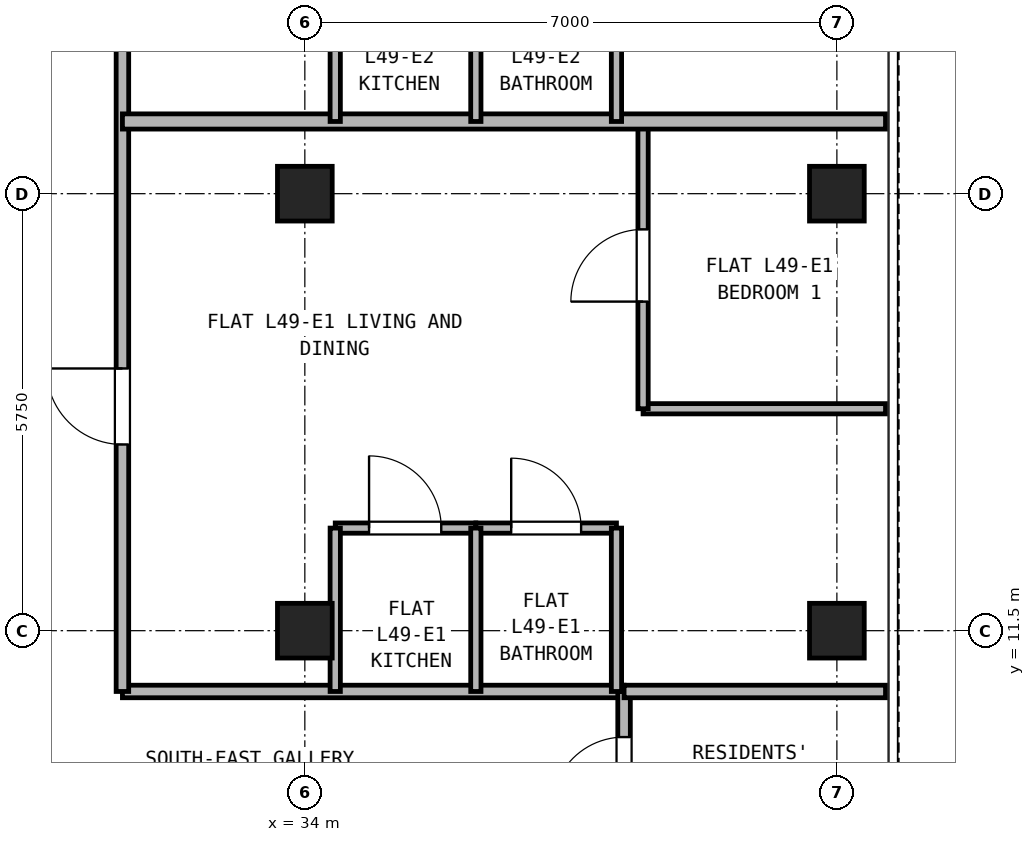
"""IFC4 building model, lengths in metres.
Left out: names, types, materials, properties, quantities, classifications, styles, units other than length and angle.
Written with IfcOpenShell. Run it as: python <this file> out.ifc"""

import sys

from ifc_helpers import new_model, si_unit, direction, frame, frame_2d, origin, origin_2d, place, context, subcontext, project, spatial, rectangle, hollow_rectangle, extrude, source, transform, mapped, element, fill, save


model = new_model("IFC4")
c1 = context("Model", 3, precision=1e-05, world=origin(), true_north=direction((0.0, 1.0)))
c2 = subcontext(c1, "Body", "Model", "MODEL_VIEW")
j1 = project(units=[si_unit("LENGTHUNIT", "METRE"), si_unit("PLANEANGLEUNIT", "RADIAN")], contexts=[c1])
p1 = place(None, origin())
s1 = spatial("IfcSite", under=j1, at=p1, CompositionType="ELEMENT")
p2 = place(p1, origin())
s2 = spatial("IfcBuilding", under=s1, at=p2, CompositionType="ELEMENT")
p3 = place(p2, frame((0.0, 0.0, 175.3)))
s3 = spatial("IfcBuildingStorey", under=s2, at=p3, CompositionType="ELEMENT", Elevation=175.3)
m1 = source(origin(), c2, "Body", "SweptSolid", [
    extrude(hollow_rectangle(XDim=0.72, YDim=0.72, WallThickness=0.04, at=origin_2d()), origin(), (0.0, 0.0, 1.0), 2.95),
])
for number, where, z_axis, x_axis in (
    (1, (41.0, 11.5, 0.0), (0.0, 0.0, 1.0), (1.0, 0.0, 0.0)),
    (2, (41.0, 17.25, 0.0), (0.0, 0.0, 1.0), (1.0, 0.0, 0.0)),
    (3, (34.0, 11.5, 0.0), (0.0, 0.0, 1.0), (1.0, 0.0, 0.0)),
    (4, (34.0, 17.25, 0.0), (0.0, 0.0, 1.0), (1.0, 0.0, 0.0)),
):
    element("IfcColumn", number, at=place(p3, frame(where, z_axis=z_axis, x_axis=x_axis)), inside=s3, PredefinedType="COLUMN", context=c2, shape_type="MappedRepresentation", body=[
        mapped(m1, transform((0.0, 0.0, 0.0), x_axis=(1.0, 0.0, 0.0), y_axis=(0.0, 1.0, 0.0), z_axis=(0.0, 0.0, 1.0), scale=1.0)),
    ])
p4 = place(p3, frame((31.6, 10.7, 0.0), z_axis=(0.0, 0.0, 1.0), x_axis=(1.0, 0.0, 0.0)))
e5 = element("IfcWall", 5, at=p4, inside=s3, PredefinedType="PARTITIONING", context=c2, shape_type="SweptSolid", body=[
    extrude(rectangle(XDim=6.6, YDim=0.165, at=frame_2d((3.3, 0.0))), origin(), (0.0, 0.0, 1.0), 2.95),
])
p5 = place(p3, frame((38.2, 8.7, 0.0), z_axis=(0.0, 0.0, 1.0), x_axis=(0.0, 1.0, 0.0)))
e6 = element("IfcWall", 6, at=p5, inside=s3, PredefinedType="PARTITIONING", context=c2, shape_type="SweptSolid", body=[
    extrude(rectangle(XDim=2.0, YDim=0.165, at=frame_2d((1.0, 0.0))), origin(), (0.0, 0.0, 1.0), 2.95),
])
p6 = place(p5, frame((0.45, 0.0, 0.0)))
e7 = element("IfcOpeningElement", 7, at=p6, cuts=e6, PredefinedType="OPENING", context=c2, shape_type="SweptSolid", body=[
    extrude(rectangle(XDim=0.95, YDim=2.15, at=frame_2d((0.475, 1.075))), frame((0.0, 0.093, 0.0), z_axis=(0.0, -1.0, 0.0), x_axis=(1.0, 0.0, 0.0)), (0.0, 0.0, 1.0), 0.185),
])
p7 = place(p3, frame((31.6, 10.7, 0.0), z_axis=(0.0, 0.0, 1.0), x_axis=(0.0, 1.0, 0.0)))
e8 = element("IfcWall", 8, at=p7, inside=s3, PredefinedType="PARTITIONING", context=c2, shape_type="SweptSolid", body=[
    extrude(rectangle(XDim=24.44, YDim=0.165, at=frame_2d((12.22, 0.0))), origin(), (0.0, 0.0, 1.0), 2.95),
])
p8 = place(p7, frame((3.25, 0.0, 0.0)))
e9 = element("IfcOpeningElement", 9, at=p8, cuts=e8, PredefinedType="OPENING", context=c2, shape_type="SweptSolid", body=[
    extrude(rectangle(XDim=1.0, YDim=2.15, at=frame_2d((0.5, 1.075))), frame((0.0, 0.093, 0.0), z_axis=(0.0, -1.0, 0.0), x_axis=(1.0, 0.0, 0.0)), (0.0, 0.0, 1.0), 0.185),
])
p9 = place(p7, frame((11.15, 0.0, 0.0)))
e10 = element("IfcOpeningElement", 10, at=p9, cuts=e8, PredefinedType="OPENING", context=c2, shape_type="SweptSolid", body=[
    extrude(rectangle(XDim=1.0, YDim=2.15, at=frame_2d((0.5, 1.075))), frame((0.0, 0.093, 0.0), z_axis=(0.0, -1.0, 0.0), x_axis=(1.0, 0.0, 0.0)), (0.0, 0.0, 1.0), 0.185),
])
p10 = place(p7, frame((17.7, 0.0, 0.0)))
e11 = element("IfcOpeningElement", 11, at=p10, cuts=e8, PredefinedType="OPENING", context=c2, shape_type="SweptSolid", body=[
    extrude(rectangle(XDim=1.0, YDim=2.15, at=frame_2d((0.5, 1.075))), frame((0.0, 0.093, 0.0), z_axis=(0.0, -1.0, 0.0), x_axis=(1.0, 0.0, 0.0)), (0.0, 0.0, 1.0), 0.185),
])
p11 = place(p3, frame((38.2, 10.7, 0.0), z_axis=(0.0, 0.0, 1.0), x_axis=(1.0, 0.0, 0.0)))
e12 = element("IfcWall", 12, at=p11, inside=s3, PredefinedType="PARTITIONING", context=c2, shape_type="SweptSolid", body=[
    extrude(rectangle(XDim=3.44, YDim=0.165, at=frame_2d((1.72, 0.0))), origin(), (0.0, 0.0, 1.0), 2.95),
])
p12 = place(p3, frame((34.4, 12.85, 0.0), z_axis=(0.0, 0.0, 1.0), x_axis=(1.0, 0.0, 0.0)))
e13 = element("IfcWall", 13, at=p12, inside=s3, PredefinedType="PARTITIONING", context=c2, shape_type="SweptSolid", body=[
    extrude(rectangle(XDim=1.85, YDim=0.135, at=frame_2d((0.925, 0.0))), origin(), (0.0, 0.0, 1.0), 2.95),
])
p13 = place(p12, frame((0.445, 0.0, 0.0)))
e14 = element("IfcOpeningElement", 14, at=p13, cuts=e13, PredefinedType="OPENING", context=c2, shape_type="SweptSolid", body=[
    extrude(rectangle(XDim=0.95, YDim=2.15, at=frame_2d((0.475, 1.075))), frame((0.0, 0.077, 0.0), z_axis=(0.0, -1.0, 0.0), x_axis=(1.0, 0.0, 0.0)), (0.0, 0.0, 1.0), 0.155),
])
p14 = place(p3, frame((36.25, 12.85, 0.0), z_axis=(0.0, 0.0, 1.0), x_axis=(1.0, 0.0, 0.0)))
e15 = element("IfcWall", 15, at=p14, inside=s3, PredefinedType="PARTITIONING", context=c2, shape_type="SweptSolid", body=[
    extrude(rectangle(XDim=1.85, YDim=0.135, at=frame_2d((0.925, 0.0))), origin(), (0.0, 0.0, 1.0), 2.95),
])
p15 = place(p14, frame((0.465, 0.0, 0.0)))
e16 = element("IfcOpeningElement", 16, at=p15, cuts=e15, PredefinedType="OPENING", context=c2, shape_type="SweptSolid", body=[
    extrude(rectangle(XDim=0.92, YDim=2.1, at=frame_2d((0.46, 1.05))), frame((0.0, 0.077, 0.0), z_axis=(0.0, -1.0, 0.0), x_axis=(1.0, 0.0, 0.0)), (0.0, 0.0, 1.0), 0.155),
])
for number, where, z_axis, x_axis in (
    (17, (34.4, 10.7, 0.0), (0.0, 0.0, 1.0), (0.0, 1.0, 0.0)),
    (18, (36.25, 10.7, 0.0), (0.0, 0.0, 1.0), (0.0, 1.0, 0.0)),
    (19, (38.1, 10.7, 0.0), (0.0, 0.0, 1.0), (0.0, 1.0, 0.0)),
):
    element("IfcWall", number, at=place(p3, frame(where, z_axis=z_axis, x_axis=x_axis)), inside=s3, PredefinedType="PARTITIONING", context=c2, shape_type="SweptSolid", body=[
        extrude(rectangle(XDim=2.15, YDim=0.135, at=frame_2d((1.075, 0.0))), origin(), (0.0, 0.0, 1.0), 2.95),
    ])
p16 = place(p3, frame((38.45, 14.42, 0.0), z_axis=(0.0, 0.0, 1.0), x_axis=(1.0, 0.0, 0.0)))
e20 = element("IfcWall", 20, at=p16, inside=s3, PredefinedType="PARTITIONING", context=c2, shape_type="SweptSolid", body=[
    extrude(rectangle(XDim=3.19, YDim=0.135, at=frame_2d((1.595, 0.0))), origin(), (0.0, 0.0, 1.0), 2.583),
])
p17 = place(p3, frame((38.45, 14.42, 0.0), z_axis=(0.0, 0.0, 1.0), x_axis=(0.0, 1.0, 0.0)))
e21 = element("IfcWall", 21, at=p17, inside=s3, PredefinedType="PARTITIONING", context=c2, shape_type="SweptSolid", body=[
    extrude(rectangle(XDim=3.78, YDim=0.135, at=frame_2d((1.89, 0.0))), origin(), (0.0, 0.0, 1.0), 2.95),
])
p18 = place(p17, frame((1.41, 0.0, 0.0)))
e22 = element("IfcOpeningElement", 22, at=p18, cuts=e21, PredefinedType="OPENING", context=c2, shape_type="SweptSolid", body=[
    extrude(rectangle(XDim=0.95, YDim=2.15, at=frame_2d((0.475, 1.075))), frame((0.0, 0.077, 0.0), z_axis=(0.0, -1.0, 0.0), x_axis=(1.0, 0.0, 0.0)), (0.0, 0.0, 1.0), 0.155),
])
p19 = place(p3, frame((31.6, 18.2, 0.0), z_axis=(0.0, 0.0, 1.0), x_axis=(1.0, 0.0, 0.0)))
e23 = element("IfcWall", 23, at=p19, inside=s3, PredefinedType="PARTITIONING", context=c2, shape_type="SweptSolid", body=[
    extrude(rectangle(XDim=10.04, YDim=0.2, at=frame_2d((5.02, 0.0))), origin(), (0.0, 0.0, 1.0), 2.95),
])
for number, where, z_axis, x_axis in (
    (24, (34.4, 18.2, 0.0), (0.0, 0.0, 1.0), (0.0, 1.0, 0.0)),
    (25, (36.25, 18.2, 0.0), (0.0, 0.0, 1.0), (0.0, 1.0, 0.0)),
    (26, (38.1, 18.2, 0.0), (0.0, 0.0, 1.0), (0.0, 1.0, 0.0)),
):
    element("IfcWall", number, at=place(p3, frame(where, z_axis=z_axis, x_axis=x_axis)), inside=s3, PredefinedType="PARTITIONING", context=c2, shape_type="SweptSolid", body=[
        extrude(rectangle(XDim=2.15, YDim=0.135, at=frame_2d((1.075, 0.0))), origin(), (0.0, 0.0, 1.0), 2.95),
    ])
p20 = place(p6, origin())
e27 = element("IfcDoor", 27, at=p20, inside=s3, OperationType="SINGLE_SWING_LEFT", PredefinedType="DOOR", context=c2, shape_type="SweptSolid", body=[
    extrude(rectangle(XDim=0.95, YDim=2.15, at=frame_2d((0.475, 1.075))), frame((0.0, 0.025, 0.0), z_axis=(0.0, -1.0, 0.0), x_axis=(1.0, 0.0, 0.0)), (0.0, 0.0, 1.0), 0.05),
])
fill(e7, e27)
p21 = place(p13, origin())
e28 = element("IfcDoor", 28, at=p21, inside=s3, OperationType="SINGLE_SWING_LEFT", PredefinedType="DOOR", context=c2, shape_type="SweptSolid", body=[
    extrude(rectangle(XDim=0.95, YDim=2.15, at=frame_2d((0.475, 1.075))), frame((0.0, 0.025, 0.0), z_axis=(0.0, -1.0, 0.0), x_axis=(1.0, 0.0, 0.0)), (0.0, 0.0, 1.0), 0.05),
])
fill(e14, e28)
p22 = place(p15, origin())
e29 = element("IfcDoor", 29, at=p22, inside=s3, OperationType="SINGLE_SWING_LEFT", PredefinedType="DOOR", context=c2, shape_type="SweptSolid", body=[
    extrude(rectangle(XDim=0.92, YDim=2.1, at=frame_2d((0.46, 1.05))), frame((0.0, 0.025, 0.0), z_axis=(0.0, -1.0, 0.0), x_axis=(1.0, 0.0, 0.0)), (0.0, 0.0, 1.0), 0.05),
])
fill(e16, e29)
p23 = place(p18, frame((0.95, 0.0, 0.0), z_axis=(0.0, 0.0, 1.0), x_axis=(-1.0, 0.0, 0.0)))
e30 = element("IfcDoor", 30, at=p23, inside=s3, OperationType="SINGLE_SWING_LEFT", PredefinedType="DOOR", context=c2, shape_type="SweptSolid", body=[
    extrude(rectangle(XDim=0.95, YDim=2.15, at=frame_2d((0.475, 1.075))), frame((0.0, 0.025, 0.0), z_axis=(0.0, -1.0, 0.0), x_axis=(1.0, 0.0, 0.0)), (0.0, 0.0, 1.0), 0.05),
])
fill(e22, e30)
p24 = place(p8, frame((1.0, 0.0, 0.0), z_axis=(0.0, 0.0, 1.0), x_axis=(-1.0, 0.0, 0.0)))
e31 = element("IfcDoor", 31, at=p24, inside=s3, OperationType="SINGLE_SWING_RIGHT", PredefinedType="DOOR", context=c2, shape_type="SweptSolid", body=[
    extrude(rectangle(XDim=1.0, YDim=2.15, at=frame_2d((0.5, 1.075))), frame((0.0, 0.025, 0.0), z_axis=(0.0, -1.0, 0.0), x_axis=(1.0, 0.0, 0.0)), (0.0, 0.0, 1.0), 0.05),
])
fill(e9, e31)
save(model, sys.argv[1])
